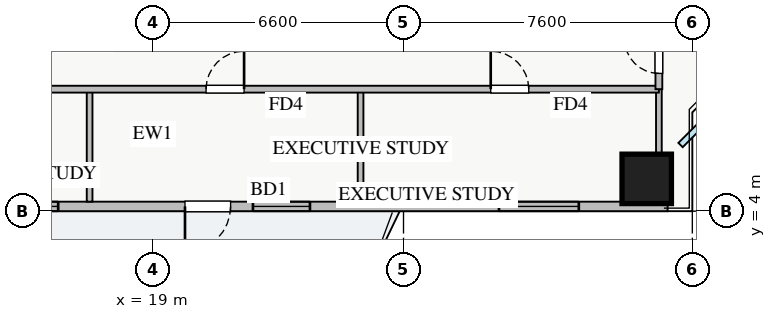
"""IFC4 building model, lengths in metres.
Left out: names, types, materials, properties, quantities, classifications, styles, units other than length and angle.
Written with IfcOpenShell. Run it as: python <this file> out.ifc"""

import sys

from ifc_helpers import new_model, si_unit, direction, frame, frame_2d, origin, origin_2d, place, context, subcontext, project, spatial, rectangle, extrude, source, transform, mapped, element, fill, save


model = new_model("IFC4")
c1 = context("Model", 3, precision=1e-05, world=origin(), true_north=direction((0.0, 1.0)))
c2 = subcontext(c1, "Body", "Model", "MODEL_VIEW")
j1 = project(units=[si_unit("LENGTHUNIT", "METRE"), si_unit("PLANEANGLEUNIT", "RADIAN")], contexts=[c1])
p1 = place(None, origin())
s1 = spatial("IfcSite", under=j1, at=p1, CompositionType="ELEMENT")
p2 = place(p1, origin())
s2 = spatial("IfcBuilding", under=s1, at=p2, CompositionType="ELEMENT")
p3 = place(p2, frame((0.0, 0.0, 26.25)))
s3 = spatial("IfcBuildingStorey", under=s2, at=p3, CompositionType="ELEMENT", Elevation=26.25)
m1 = source(origin(), c2, "Body", "SweptSolid", [
    extrude(rectangle(XDim=1.3, YDim=1.3, at=origin_2d()), origin(), (0.0, 0.0, 1.0), 3.25),
])
p4 = place(p3, frame((32.0, 4.85, 0.0), z_axis=(0.0, 0.0, 1.0), x_axis=(1.0, 0.0, 0.0)))
e1 = element("IfcColumn", 1, at=p4, inside=s3, PredefinedType="COLUMN", context=c2, shape_type="MappedRepresentation", body=[
    mapped(m1, transform((0.0, 0.0, 0.0), x_axis=(1.0, 0.0, 0.0), y_axis=(0.0, 1.0, 0.0), z_axis=(0.0, 0.0, 1.0), scale=1.0)),
])
p5 = place(p3, frame((5.45, 4.125, 0.0), z_axis=(0.0, 0.0, 1.0), x_axis=(1.0, 0.0, 0.0)))
e2 = element("IfcWall", 2, at=p5, inside=s3, PredefinedType="STANDARD", context=c2, shape_type="SweptSolid", body=[
    extrude(rectangle(XDim=27.1, YDim=0.25, at=frame_2d((13.55, 0.0))), origin(), (0.0, 0.0, 1.0), 2.61),
])
p6 = place(p5, frame((14.4, 0.0, 0.0)))
e3 = element("IfcOpeningElement", 3, at=p6, cuts=e2, PredefinedType="OPENING", context=c2, shape_type="SweptSolid", body=[
    extrude(rectangle(XDim=1.2, YDim=2.1, at=frame_2d((0.6, 1.05))), frame((0.0, 0.135, 0.0), z_axis=(0.0, -1.0, 0.0), x_axis=(1.0, 0.0, 0.0)), (0.0, 0.0, 1.0), 0.27),
])
p7 = place(p5, frame((1.48, 0.0, 0.9)))
e4 = element("IfcOpeningElement", 4, at=p7, cuts=e2, PredefinedType="OPENING", context=c2, shape_type="SweptSolid", body=[
    extrude(rectangle(XDim=1.5, YDim=1.5, at=frame_2d((0.75, 0.75))), frame((0.0, 0.135, 0.0), z_axis=(0.0, -1.0, 0.0), x_axis=(1.0, 0.0, 0.0)), (0.0, 0.0, 1.0), 0.27),
])
p8 = place(p5, frame((9.263, 0.0, 0.9)))
e5 = element("IfcOpeningElement", 5, at=p8, cuts=e2, PredefinedType="OPENING", context=c2, shape_type="SweptSolid", body=[
    extrude(rectangle(XDim=1.8, YDim=1.45, at=frame_2d((0.9, 0.725))), frame((0.0, 0.135, 0.0), z_axis=(0.0, -1.0, 0.0), x_axis=(1.0, 0.0, 0.0)), (0.0, 0.0, 1.0), 0.27),
])
p9 = place(p5, frame((16.188, 0.0, 0.9)))
e6 = element("IfcOpeningElement", 6, at=p9, cuts=e2, PredefinedType="OPENING", context=c2, shape_type="SweptSolid", body=[
    extrude(rectangle(XDim=1.5, YDim=1.45, at=frame_2d((0.75, 0.725))), frame((0.0, 0.135, 0.0), z_axis=(0.0, -1.0, 0.0), x_axis=(1.0, 0.0, 0.0)), (0.0, 0.0, 1.0), 0.27),
])
p10 = place(p5, frame((22.663, 0.0, 0.9)))
e7 = element("IfcOpeningElement", 7, at=p10, cuts=e2, PredefinedType="OPENING", context=c2, shape_type="SweptSolid", body=[
    extrude(rectangle(XDim=2.1, YDim=1.48, at=frame_2d((1.05, 0.74))), frame((0.0, 0.135, 0.0), z_axis=(0.0, -1.0, 0.0), x_axis=(1.0, 0.0, 0.0)), (0.0, 0.0, 1.0), 0.27),
])
p11 = place(p5, frame((5.114, 0.0, 0.9)))
e8 = element("IfcOpeningElement", 8, at=p11, cuts=e2, PredefinedType="OPENING", context=c2, shape_type="SweptSolid", body=[
    extrude(rectangle(XDim=2.4, YDim=1.5, at=frame_2d((1.2, 0.75))), frame((0.0, 0.135, 0.0), z_axis=(0.0, -1.0, 0.0), x_axis=(1.0, 0.0, 0.0)), (0.0, 0.0, 1.0), 0.27),
])
for number, where, z_axis, x_axis in (
    (9, (17.34, 4.25, 0.0), (0.0, 0.0, 1.0), (0.0, 1.0, 0.0)),
    (10, (24.47, 4.25, 0.0), (0.0, 0.0, 1.0), (0.0, 1.0, 0.0)),
    (11, (32.32, 4.25, 0.0), (0.0, 0.0, 1.0), (0.0, 1.0, 0.0)),
):
    element("IfcWall", number, at=place(p3, frame(where, z_axis=z_axis, x_axis=x_axis)), inside=s3, PredefinedType="PARTITIONING", context=c2, shape_type="SweptSolid", body=[
        extrude(rectangle(XDim=2.96, YDim=0.15, at=frame_2d((1.48, 0.0))), origin(), (0.0, 0.0, 1.0), 3.07),
    ])
p12 = place(p3, frame((8.78, 7.21, 0.0), z_axis=(0.0, 0.0, 1.0), x_axis=(1.0, 0.0, 0.0)))
e12 = element("IfcWall", 12, at=p12, inside=s3, PredefinedType="PARTITIONING", context=c2, shape_type="SweptSolid", body=[
    extrude(rectangle(XDim=23.54, YDim=0.18, at=frame_2d((11.77, 0.0))), origin(), (0.0, 0.0, 1.0), 3.07),
])
p13 = place(p12, frame((3.78, 0.0, 0.0)))
e13 = element("IfcOpeningElement", 13, at=p13, cuts=e12, PredefinedType="OPENING", context=c2, shape_type="SweptSolid", body=[
    extrude(rectangle(XDim=1.0, YDim=2.05, at=frame_2d((0.5, 1.025))), frame((0.0, 0.1, 0.0), z_axis=(0.0, -1.0, 0.0), x_axis=(1.0, 0.0, 0.0)), (0.0, 0.0, 1.0), 0.2),
])
p14 = place(p12, frame((11.625, 0.0, 0.0)))
e14 = element("IfcOpeningElement", 14, at=p14, cuts=e12, PredefinedType="OPENING", context=c2, shape_type="SweptSolid", body=[
    extrude(rectangle(XDim=1.0, YDim=2.05, at=frame_2d((0.5, 1.025))), frame((0.0, 0.1, 0.0), z_axis=(0.0, -1.0, 0.0), x_axis=(1.0, 0.0, 0.0)), (0.0, 0.0, 1.0), 0.2),
])
p15 = place(p12, frame((19.115, 0.0, 0.0)))
e15 = element("IfcOpeningElement", 15, at=p15, cuts=e12, PredefinedType="OPENING", context=c2, shape_type="SweptSolid", body=[
    extrude(rectangle(XDim=1.0, YDim=2.05, at=frame_2d((0.5, 1.025))), frame((0.0, 0.1, 0.0), z_axis=(0.0, -1.0, 0.0), x_axis=(1.0, 0.0, 0.0)), (0.0, 0.0, 1.0), 0.2),
])
p16 = place(p3, frame((32.32, 7.21, 0.0), z_axis=(0.0, 0.0, 1.0), x_axis=(0.0, 1.0, 0.0)))
e16 = element("IfcWall", 16, at=p16, inside=s3, PredefinedType="PARTITIONING", context=c2, shape_type="SweptSolid", body=[
    extrude(rectangle(XDim=31.23, YDim=0.18, at=frame_2d((15.615, 0.0))), origin(), (0.0, 0.0, 1.0), 2.715),
])
p17 = place(p16, frame((30.09, 0.0, 0.0)))
e17 = element("IfcOpeningElement", 17, at=p17, cuts=e16, PredefinedType="OPENING", context=c2, shape_type="SweptSolid", body=[
    extrude(rectangle(XDim=0.9, YDim=2.05, at=frame_2d((0.45, 1.025))), frame((0.0, 0.1, 0.0), z_axis=(0.0, -1.0, 0.0), x_axis=(1.0, 0.0, 0.0)), (0.0, 0.0, 1.0), 0.2),
])
p18 = place(p16, frame((0.415, 0.0, 0.0)))
e18 = element("IfcOpeningElement", 18, at=p18, cuts=e16, PredefinedType="OPENING", context=c2, shape_type="SweptSolid", body=[
    extrude(rectangle(XDim=0.9, YDim=2.05, at=frame_2d((0.45, 1.025))), frame((0.0, 0.1, 0.0), z_axis=(0.0, -1.0, 0.0), x_axis=(1.0, 0.0, 0.0)), (0.0, 0.0, 1.0), 0.2),
])
p19 = place(p16, frame((8.575, 0.0, 0.0)))
e19 = element("IfcOpeningElement", 19, at=p19, cuts=e16, PredefinedType="OPENING", context=c2, shape_type="SweptSolid", body=[
    extrude(rectangle(XDim=1.0, YDim=2.05, at=frame_2d((0.5, 1.025))), frame((0.0, 0.1, 0.0), z_axis=(0.0, -1.0, 0.0), x_axis=(1.0, 0.0, 0.0)), (0.0, 0.0, 1.0), 0.2),
])
p20 = place(p16, frame((19.375, 0.0, 0.0)))
e20 = element("IfcOpeningElement", 20, at=p20, cuts=e16, PredefinedType="OPENING", context=c2, shape_type="SweptSolid", body=[
    extrude(rectangle(XDim=1.0, YDim=2.05, at=frame_2d((0.5, 1.025))), frame((0.0, 0.1, 0.0), z_axis=(0.0, -1.0, 0.0), x_axis=(1.0, 0.0, 0.0)), (0.0, 0.0, 1.0), 0.2),
])
m2 = source(origin(), c2, "Body", "SweptSolid", [
    extrude(rectangle(XDim=1.2, YDim=2.1, at=frame_2d((0.6, 1.05))), frame((0.0, 0.025, 0.0), z_axis=(0.0, -1.0, 0.0), x_axis=(1.0, 0.0, 0.0)), (0.0, 0.0, 1.0), 0.05),
])
p21 = place(p6, frame((1.2, 0.0, 0.0), z_axis=(0.0, 0.0, 1.0), x_axis=(-1.0, 0.0, 0.0)))
e21 = element("IfcDoor", 21, at=p21, inside=s3, OperationType="SINGLE_SWING_LEFT", PredefinedType="DOOR", context=c2, shape_type="MappedRepresentation", body=[
    mapped(m2, transform((0.0, 0.0, 0.0), x_axis=(1.0, 0.0, 0.0), y_axis=(0.0, 1.0, 0.0), z_axis=(0.0, 0.0, 1.0), scale=1.0)),
])
fill(e3, e21)
m3 = source(origin(), c2, "Body", "SweptSolid", [
    extrude(rectangle(XDim=1.8, YDim=1.45, at=frame_2d((0.9, 0.725))), frame((0.0, 0.03, 0.0), z_axis=(0.0, -1.0, 0.0), x_axis=(1.0, 0.0, 0.0)), (0.0, 0.0, 1.0), 0.06),
])
p22 = place(p8, origin())
e22 = element("IfcWindow", 22, at=p22, inside=s3, PartitioningType="DOUBLE_PANEL_VERTICAL", PredefinedType="WINDOW", context=c2, shape_type="MappedRepresentation", body=[
    mapped(m3, transform((0.0, 0.0, 0.0), x_axis=(1.0, 0.0, 0.0), y_axis=(0.0, 1.0, 0.0), z_axis=(0.0, 0.0, 1.0), scale=1.0)),
])
fill(e5, e22)
m4 = source(origin(), c2, "Body", "SweptSolid", [
    extrude(rectangle(XDim=1.5, YDim=1.45, at=frame_2d((0.75, 0.725))), frame((0.0, 0.03, 0.0), z_axis=(0.0, -1.0, 0.0), x_axis=(1.0, 0.0, 0.0)), (0.0, 0.0, 1.0), 0.06),
])
p23 = place(p9, origin())
e23 = element("IfcWindow", 23, at=p23, inside=s3, PartitioningType="DOUBLE_PANEL_VERTICAL", PredefinedType="WINDOW", context=c2, shape_type="MappedRepresentation", body=[
    mapped(m4, transform((0.0, 0.0, 0.0), x_axis=(1.0, 0.0, 0.0), y_axis=(0.0, 1.0, 0.0), z_axis=(0.0, 0.0, 1.0), scale=1.0)),
])
fill(e6, e23)
m5 = source(origin(), c2, "Body", "SweptSolid", [
    extrude(rectangle(XDim=2.1, YDim=1.48, at=frame_2d((1.05, 0.74))), frame((0.0, 0.03, 0.0), z_axis=(0.0, -1.0, 0.0), x_axis=(1.0, 0.0, 0.0)), (0.0, 0.0, 1.0), 0.06),
])
p24 = place(p10, origin())
e24 = element("IfcWindow", 24, at=p24, inside=s3, PartitioningType="TRIPLE_PANEL_VERTICAL", PredefinedType="WINDOW", context=c2, shape_type="MappedRepresentation", body=[
    mapped(m5, transform((0.0, 0.0, 0.0), x_axis=(1.0, 0.0, 0.0), y_axis=(0.0, 1.0, 0.0), z_axis=(0.0, 0.0, 1.0), scale=1.0)),
])
fill(e7, e24)
m6 = source(origin(), c2, "Body", "SweptSolid", [
    extrude(rectangle(XDim=1.0, YDim=2.05, at=frame_2d((0.5, 1.025))), frame((0.0, 0.025, 0.0), z_axis=(0.0, -1.0, 0.0), x_axis=(1.0, 0.0, 0.0)), (0.0, 0.0, 1.0), 0.05),
])
p25 = place(p14, origin())
e25 = element("IfcDoor", 25, at=p25, inside=s3, OperationType="SINGLE_SWING_RIGHT", PredefinedType="DOOR", context=c2, shape_type="MappedRepresentation", body=[
    mapped(m6, transform((0.0, 0.0, 0.0), x_axis=(1.0, 0.0, 0.0), y_axis=(0.0, 1.0, 0.0), z_axis=(0.0, 0.0, 1.0), scale=1.0)),
])
fill(e14, e25)
p26 = place(p15, origin())
e26 = element("IfcDoor", 26, at=p26, inside=s3, OperationType="SINGLE_SWING_LEFT", PredefinedType="DOOR", context=c2, shape_type="MappedRepresentation", body=[
    mapped(m6, transform((0.0, 0.0, 0.0), x_axis=(1.0, 0.0, 0.0), y_axis=(0.0, 1.0, 0.0), z_axis=(0.0, 0.0, 1.0), scale=1.0)),
])
fill(e15, e26)
m7 = source(origin(), c2, "Body", "SweptSolid", [
    extrude(rectangle(XDim=0.9, YDim=2.05, at=frame_2d((0.45, 1.025))), frame((0.0, 0.025, 0.0), z_axis=(0.0, -1.0, 0.0), x_axis=(1.0, 0.0, 0.0)), (0.0, 0.0, 1.0), 0.05),
])
p27 = place(p18, origin())
e27 = element("IfcDoor", 27, at=p27, inside=s3, OperationType="SINGLE_SWING_RIGHT", PredefinedType="DOOR", context=c2, shape_type="MappedRepresentation", body=[
    mapped(m7, transform((0.0, 0.0, 0.0), x_axis=(1.0, 0.0, 0.0), y_axis=(0.0, 1.0, 0.0), z_axis=(0.0, 0.0, 1.0), scale=1.0)),
])
fill(e18, e27)
save(model, sys.argv[1])
